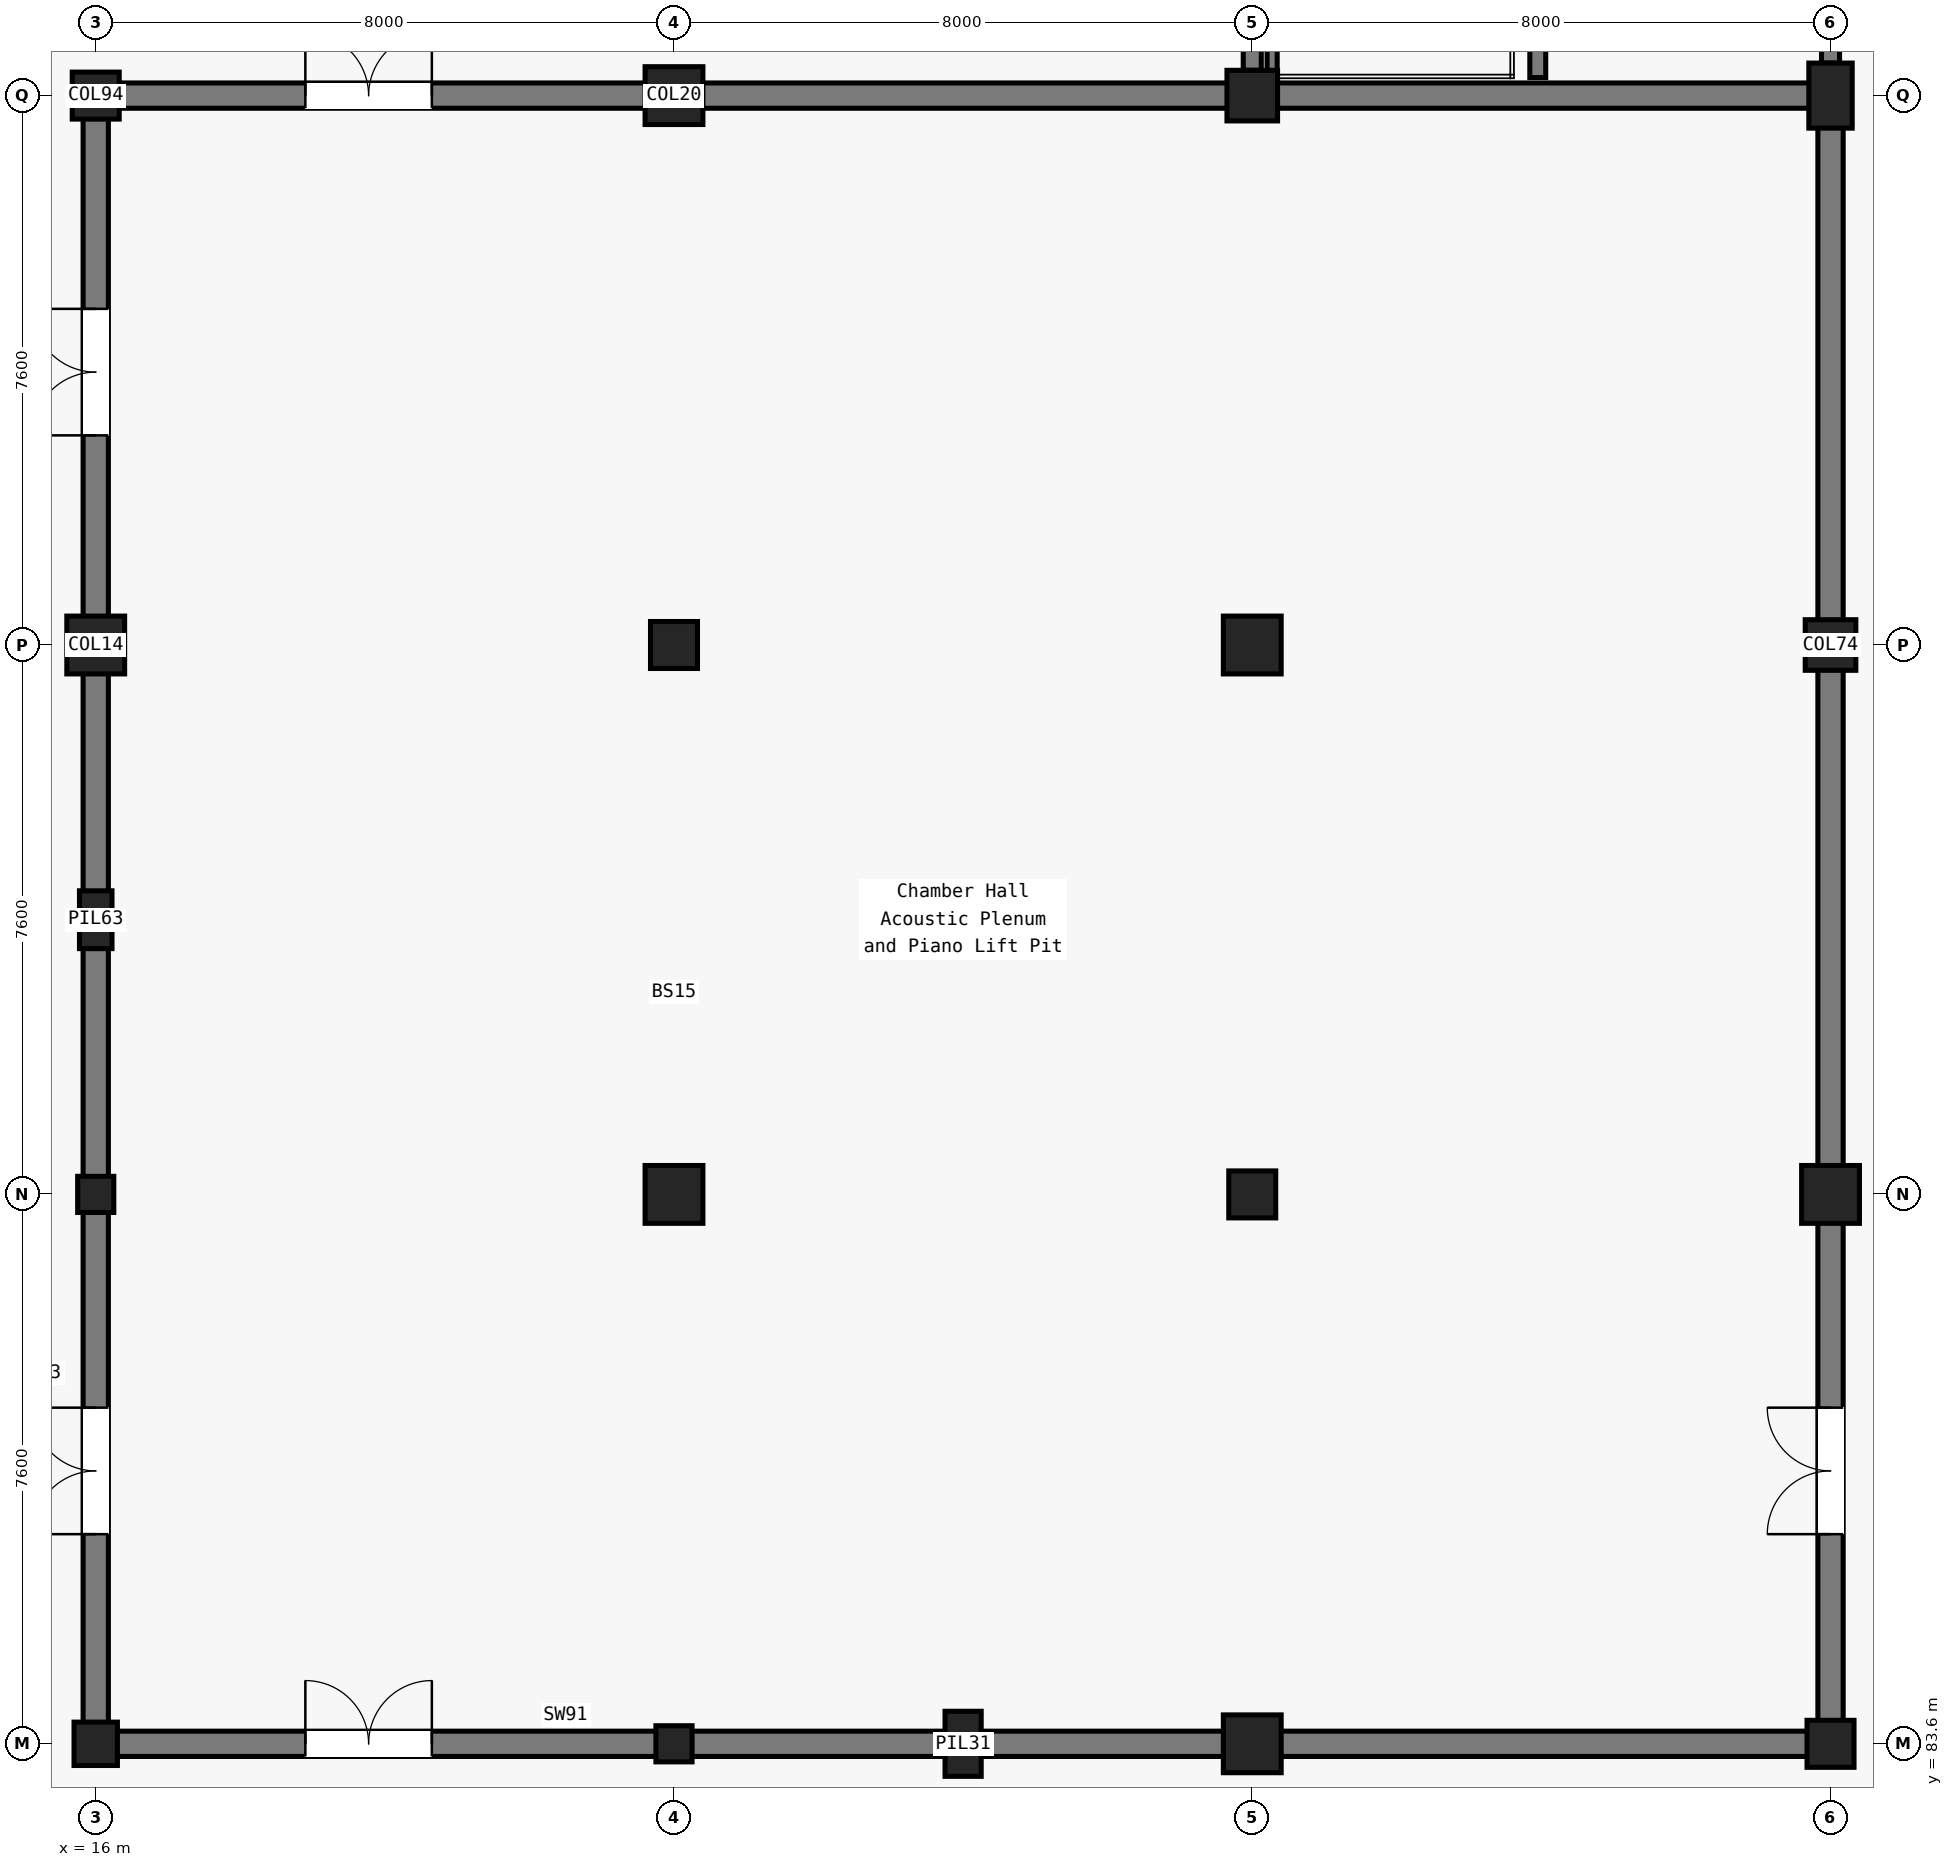
"""IFC4 building model, lengths in metres.
Left out: names, types, materials, properties, quantities, classifications, styles, units other than length and angle.
Written with IfcOpenShell. Run it as: python <this file> out.ifc"""

import sys

from ifc_helpers import new_model, si_unit, direction, frame, frame_2d, origin, origin_2d, place, context, subcontext, project, spatial, rectangle, circle, extrude, element, fill, save


model = new_model("IFC4")
c1 = context("Model", 3, precision=1e-05, world=origin(), true_north=direction((0.0, 1.0)))
c2 = subcontext(c1, "Body", "Model", "MODEL_VIEW")
j1 = project(units=[si_unit("LENGTHUNIT", "METRE"), si_unit("PLANEANGLEUNIT", "RADIAN")], contexts=[c1])
p1 = place(None, origin())
s1 = spatial("IfcSite", under=j1, at=p1, CompositionType="ELEMENT")
p2 = place(p1, origin())
s2 = spatial("IfcBuilding", under=s1, at=p2, CompositionType="ELEMENT")
p3 = place(p2, frame((0.0, 0.0, -5.4)))
s3 = spatial("IfcBuildingStorey", under=s2, at=p3, CompositionType="ELEMENT", Elevation=-5.4)
p4 = place(p3, frame((16.0, 83.6, 0.0), z_axis=(0.0, 0.0, 1.0), x_axis=(1.0, 0.0, 0.0)))
e1 = element("IfcColumn", 1, at=p4, inside=s3, PredefinedType="COLUMN", context=c2, shape_type="SweptSolid", body=[
    extrude(rectangle(XDim=0.6, YDim=0.6, at=origin_2d()), origin(), (0.0, 0.0, 1.0), 5.4),
])
p5 = place(p3, frame((16.0, 91.2, 0.0), z_axis=(0.0, 0.0, 1.0), x_axis=(1.0, 0.0, 0.0)))
e2 = element("IfcColumn", 2, at=p5, inside=s3, PredefinedType="COLUMN", context=c2, shape_type="SweptSolid", body=[
    extrude(rectangle(XDim=0.5, YDim=0.5, at=origin_2d()), origin(), (0.0, 0.0, 1.0), 5.4),
])
p6 = place(p3, frame((16.0, 98.8, 0.0), z_axis=(0.0, 0.0, 1.0), x_axis=(1.0, 0.0, 0.0)))
e3 = element("IfcColumn", 3, at=p6, inside=s3, PredefinedType="COLUMN", context=c2, shape_type="SweptSolid", body=[
    extrude(circle(Radius=0.4, at=origin_2d()), origin(), (0.0, 0.0, 1.0), 5.4),
])
p7 = place(p3, frame((16.0, 106.4, 0.0), z_axis=(0.0, 0.0, 1.0), x_axis=(1.0, 0.0, 0.0)))
e4 = element("IfcColumn", 4, at=p7, inside=s3, PredefinedType="COLUMN", context=c2, shape_type="SweptSolid", body=[
    extrude(circle(Radius=0.325, at=origin_2d()), origin(), (0.0, 0.0, 1.0), 5.4),
])
p8 = place(p3, frame((24.0, 83.6, 0.0), z_axis=(0.0, 0.0, 1.0), x_axis=(1.0, 0.0, 0.0)))
e5 = element("IfcColumn", 5, at=p8, inside=s3, PredefinedType="COLUMN", context=c2, shape_type="SweptSolid", body=[
    extrude(rectangle(XDim=0.5, YDim=0.5, at=origin_2d()), origin(), (0.0, 0.0, 1.0), 5.4),
])
p9 = place(p3, frame((24.0, 91.2, 0.0), z_axis=(0.0, 0.0, 1.0), x_axis=(1.0, 0.0, 0.0)))
e6 = element("IfcColumn", 6, at=p9, inside=s3, PredefinedType="COLUMN", context=c2, shape_type="SweptSolid", body=[
    extrude(circle(Radius=0.4, at=origin_2d()), origin(), (0.0, 0.0, 1.0), 5.4),
])
p10 = place(p3, frame((24.0, 98.8, 0.0), z_axis=(0.0, 0.0, 1.0), x_axis=(1.0, 0.0, 0.0)))
e7 = element("IfcColumn", 7, at=p10, inside=s3, PredefinedType="COLUMN", context=c2, shape_type="SweptSolid", body=[
    extrude(circle(Radius=0.325, at=origin_2d()), origin(), (0.0, 0.0, 1.0), 5.4),
])
p11 = place(p3, frame((24.0, 106.4, 0.0), z_axis=(0.0, 0.0, 1.0), x_axis=(1.0, 0.0, 0.0)))
e8 = element("IfcColumn", 8, at=p11, inside=s3, PredefinedType="COLUMN", context=c2, shape_type="SweptSolid", body=[
    extrude(rectangle(XDim=0.8, YDim=0.8, at=origin_2d()), origin(), (0.0, 0.0, 1.0), 5.4),
])
p12 = place(p3, frame((32.0, 83.6, 0.0), z_axis=(0.0, 0.0, 1.0), x_axis=(1.0, 0.0, 0.0)))
e9 = element("IfcColumn", 9, at=p12, inside=s3, PredefinedType="COLUMN", context=c2, shape_type="SweptSolid", body=[
    extrude(circle(Radius=0.4, at=origin_2d()), origin(), (0.0, 0.0, 1.0), 5.4),
])
p13 = place(p3, frame((32.0, 91.2, 0.0), z_axis=(0.0, 0.0, 1.0), x_axis=(1.0, 0.0, 0.0)))
e10 = element("IfcColumn", 10, at=p13, inside=s3, PredefinedType="COLUMN", context=c2, shape_type="SweptSolid", body=[
    extrude(circle(Radius=0.325, at=origin_2d()), origin(), (0.0, 0.0, 1.0), 5.4),
])
p14 = place(p3, frame((32.0, 98.8, 0.0), z_axis=(0.0, 0.0, 1.0), x_axis=(1.0, 0.0, 0.0)))
e11 = element("IfcColumn", 11, at=p14, inside=s3, PredefinedType="COLUMN", context=c2, shape_type="SweptSolid", body=[
    extrude(rectangle(XDim=0.8, YDim=0.8, at=origin_2d()), origin(), (0.0, 0.0, 1.0), 5.4),
])
p15 = place(p3, frame((32.0, 106.4, 0.0), z_axis=(0.0, 0.0, 1.0), x_axis=(1.0, 0.0, 0.0)))
e12 = element("IfcColumn", 12, at=p15, inside=s3, PredefinedType="COLUMN", context=c2, shape_type="SweptSolid", body=[
    extrude(rectangle(XDim=0.7, YDim=0.7, at=origin_2d()), origin(), (0.0, 0.0, 1.0), 5.4),
])
p16 = place(p3, frame((40.0, 83.6, 0.0), z_axis=(0.0, 0.0, 1.0), x_axis=(1.0, 0.0, 0.0)))
e13 = element("IfcColumn", 13, at=p16, inside=s3, PredefinedType="COLUMN", context=c2, shape_type="SweptSolid", body=[
    extrude(circle(Radius=0.325, at=origin_2d()), origin(), (0.0, 0.0, 1.0), 5.4),
])
p17 = place(p3, frame((40.0, 91.2, 0.0), z_axis=(0.0, 0.0, 1.0), x_axis=(1.0, 0.0, 0.0)))
e14 = element("IfcColumn", 14, at=p17, inside=s3, PredefinedType="COLUMN", context=c2, shape_type="SweptSolid", body=[
    extrude(rectangle(XDim=0.8, YDim=0.8, at=origin_2d()), origin(), (0.0, 0.0, 1.0), 5.4),
])
p18 = place(p3, frame((40.0, 98.8, 0.0), z_axis=(0.0, 0.0, 1.0), x_axis=(1.0, 0.0, 0.0)))
e15 = element("IfcColumn", 15, at=p18, inside=s3, PredefinedType="COLUMN", context=c2, shape_type="SweptSolid", body=[
    extrude(rectangle(XDim=0.7, YDim=0.7, at=origin_2d()), origin(), (0.0, 0.0, 1.0), 5.4),
])
p19 = place(p3, frame((40.0, 106.4, 0.0), z_axis=(0.0, 0.0, 1.0), x_axis=(1.0, 0.0, 0.0)))
e16 = element("IfcColumn", 16, at=p19, inside=s3, PredefinedType="COLUMN", context=c2, shape_type="SweptSolid", body=[
    extrude(rectangle(XDim=0.6, YDim=0.9, at=origin_2d()), origin(), (0.0, 0.0, 1.0), 5.4),
])
p20 = place(p3, frame((16.0, 95.0, 0.0), z_axis=(0.0, 0.0, 1.0), x_axis=(1.0, 0.0, 0.0)))
e17 = element("IfcColumn", 17, at=p20, inside=s3, PredefinedType="PILASTER", context=c2, shape_type="SweptSolid", body=[
    extrude(rectangle(XDim=0.45, YDim=0.8, at=origin_2d()), origin(), (0.0, 0.0, 1.0), 5.4),
])
p21 = place(p3, frame((28.0, 83.6, 0.0), z_axis=(0.0, 0.0, 1.0), x_axis=(1.0, 0.0, 0.0)))
e18 = element("IfcColumn", 18, at=p21, inside=s3, PredefinedType="PILASTER", context=c2, shape_type="SweptSolid", body=[
    extrude(rectangle(XDim=0.5, YDim=0.9, at=origin_2d()), origin(), (0.0, 0.0, 1.0), 5.4),
])
p22 = place(p3, frame((16.0, 83.6, 0.0), z_axis=(0.0, 0.0, 1.0), x_axis=(1.0, 0.0, 0.0)))
e19 = element("IfcWall", 19, at=p22, inside=s3, PredefinedType="SHEAR", context=c2, shape_type="SweptSolid", body=[
    extrude(rectangle(XDim=8.0, YDim=0.35, at=frame_2d((4.0, 0.0))), origin(), (0.0, 0.0, 1.0), 5.08),
])
p23 = place(p22, frame((2.9, 0.0, 0.0)))
e20 = element("IfcOpeningElement", 20, at=p23, cuts=e19, PredefinedType="OPENING", context=c2, shape_type="SweptSolid", body=[
    extrude(rectangle(XDim=1.75, YDim=2.25, at=frame_2d((0.875, 1.125))), frame((0.0, 0.185, 0.0), z_axis=(0.0, -1.0, 0.0), x_axis=(1.0, 0.0, 0.0)), (0.0, 0.0, 1.0), 0.37),
])
for number, where, z_axis, x_axis in (
    (21, (24.0, 83.6, 0.0), (0.0, 0.0, 1.0), (1.0, 0.0, 0.0)),
    (22, (32.0, 83.6, 0.0), (0.0, 0.0, 1.0), (1.0, 0.0, 0.0)),
):
    element("IfcWall", number, at=place(p3, frame(where, z_axis=z_axis, x_axis=x_axis)), inside=s3, PredefinedType="SHEAR", context=c2, shape_type="SweptSolid", body=[
        extrude(rectangle(XDim=8.0, YDim=0.35, at=frame_2d((4.0, 0.0))), origin(), (0.0, 0.0, 1.0), 5.08),
    ])
p24 = place(p3, frame((16.0, 106.4, 0.0), z_axis=(0.0, 0.0, 1.0), x_axis=(1.0, 0.0, 0.0)))
e23 = element("IfcWall", 23, at=p24, inside=s3, PredefinedType="SHEAR", context=c2, shape_type="SweptSolid", body=[
    extrude(rectangle(XDim=8.0, YDim=0.35, at=frame_2d((4.0, 0.0))), origin(), (0.0, 0.0, 1.0), 5.08),
])
p25 = place(p24, frame((2.9, 0.0, 0.0)))
e24 = element("IfcOpeningElement", 24, at=p25, cuts=e23, PredefinedType="OPENING", context=c2, shape_type="SweptSolid", body=[
    extrude(rectangle(XDim=1.75, YDim=2.25, at=frame_2d((0.875, 1.125))), frame((0.0, 0.185, 0.0), z_axis=(0.0, -1.0, 0.0), x_axis=(1.0, 0.0, 0.0)), (0.0, 0.0, 1.0), 0.37),
])
for number, where, z_axis, x_axis in (
    (25, (24.0, 106.4, 0.0), (0.0, 0.0, 1.0), (1.0, 0.0, 0.0)),
    (26, (32.0, 106.4, 0.0), (0.0, 0.0, 1.0), (1.0, 0.0, 0.0)),
):
    element("IfcWall", number, at=place(p3, frame(where, z_axis=z_axis, x_axis=x_axis)), inside=s3, PredefinedType="SHEAR", context=c2, shape_type="SweptSolid", body=[
        extrude(rectangle(XDim=8.0, YDim=0.35, at=frame_2d((4.0, 0.0))), origin(), (0.0, 0.0, 1.0), 5.08),
    ])
p26 = place(p3, frame((16.0, 83.6, 0.0), z_axis=(0.0, 0.0, 1.0), x_axis=(0.0, 1.0, 0.0)))
e27 = element("IfcWall", 27, at=p26, inside=s3, PredefinedType="SHEAR", context=c2, shape_type="SweptSolid", body=[
    extrude(rectangle(XDim=7.6, YDim=0.35, at=frame_2d((3.8, 0.0))), origin(), (0.0, 0.0, 1.0), 5.08),
])
p27 = place(p26, frame((2.9, 0.0, 0.0)))
e28 = element("IfcOpeningElement", 28, at=p27, cuts=e27, PredefinedType="OPENING", context=c2, shape_type="SweptSolid", body=[
    extrude(rectangle(XDim=1.75, YDim=2.25, at=frame_2d((0.875, 1.125))), frame((0.0, 0.185, 0.0), z_axis=(0.0, -1.0, 0.0), x_axis=(1.0, 0.0, 0.0)), (0.0, 0.0, 1.0), 0.37),
])
p28 = place(p3, frame((16.0, 91.2, 0.0), z_axis=(0.0, 0.0, 1.0), x_axis=(0.0, 1.0, 0.0)))
e29 = element("IfcWall", 29, at=p28, inside=s3, PredefinedType="SHEAR", context=c2, shape_type="SweptSolid", body=[
    extrude(rectangle(XDim=7.6, YDim=0.35, at=frame_2d((3.8, 0.0))), origin(), (0.0, 0.0, 1.0), 5.08),
])
p29 = place(p3, frame((16.0, 98.8, 0.0), z_axis=(0.0, 0.0, 1.0), x_axis=(0.0, 1.0, 0.0)))
e30 = element("IfcWall", 30, at=p29, inside=s3, PredefinedType="SHEAR", context=c2, shape_type="SweptSolid", body=[
    extrude(rectangle(XDim=7.6, YDim=0.35, at=frame_2d((3.8, 0.0))), origin(), (0.0, 0.0, 1.0), 5.08),
])
p30 = place(p29, frame((2.9, 0.0, 0.0)))
e31 = element("IfcOpeningElement", 31, at=p30, cuts=e30, PredefinedType="OPENING", context=c2, shape_type="SweptSolid", body=[
    extrude(rectangle(XDim=1.75, YDim=2.25, at=frame_2d((0.875, 1.125))), frame((0.0, 0.185, 0.0), z_axis=(0.0, -1.0, 0.0), x_axis=(1.0, 0.0, 0.0)), (0.0, 0.0, 1.0), 0.37),
])
p31 = place(p3, frame((40.0, 83.6, 0.0), z_axis=(0.0, 0.0, 1.0), x_axis=(0.0, 1.0, 0.0)))
e32 = element("IfcWall", 32, at=p31, inside=s3, PredefinedType="SHEAR", context=c2, shape_type="SweptSolid", body=[
    extrude(rectangle(XDim=7.6, YDim=0.35, at=frame_2d((3.8, 0.0))), origin(), (0.0, 0.0, 1.0), 5.08),
])
p32 = place(p31, frame((2.9, 0.0, 0.0)))
e33 = element("IfcOpeningElement", 33, at=p32, cuts=e32, PredefinedType="OPENING", context=c2, shape_type="SweptSolid", body=[
    extrude(rectangle(XDim=1.75, YDim=2.25, at=frame_2d((0.875, 1.125))), frame((0.0, 0.185, 0.0), z_axis=(0.0, -1.0, 0.0), x_axis=(1.0, 0.0, 0.0)), (0.0, 0.0, 1.0), 0.37),
])
p33 = place(p3, frame((40.0, 91.2, 0.0), z_axis=(0.0, 0.0, 1.0), x_axis=(0.0, 1.0, 0.0)))
e34 = element("IfcWall", 34, at=p33, inside=s3, PredefinedType="SHEAR", context=c2, shape_type="SweptSolid", body=[
    extrude(rectangle(XDim=7.6, YDim=0.35, at=frame_2d((3.8, 0.0))), origin(), (0.0, 0.0, 1.0), 5.08),
])
p34 = place(p3, frame((40.0, 98.8, 0.0), z_axis=(0.0, 0.0, 1.0), x_axis=(0.0, 1.0, 0.0)))
e35 = element("IfcWall", 35, at=p34, inside=s3, PredefinedType="SHEAR", context=c2, shape_type="SweptSolid", body=[
    extrude(rectangle(XDim=7.6, YDim=0.35, at=frame_2d((3.8, 0.0))), origin(), (0.0, 0.0, 1.0), 5.08),
])
p35 = place(p3, frame((32.0, 106.75, 0.0), z_axis=(0.0, 0.0, 1.0), x_axis=(0.0, 1.0, 0.0)))
e36 = element("IfcWall", 36, at=p35, inside=s3, PredefinedType="SOLIDWALL", context=c2, shape_type="SweptSolid", body=[
    extrude(rectangle(XDim=6.8, YDim=0.25, at=frame_2d((3.4, 0.0))), origin(), (0.0, 0.0, 1.0), 4.205),
])
p36 = place(p3, frame((35.95, 106.65, 0.0), z_axis=(0.0, 0.0, 1.0), x_axis=(0.0, 1.0, 0.0)))
e37 = element("IfcWall", 37, at=p36, inside=s3, PredefinedType="SOLIDWALL", context=c2, shape_type="SweptSolid", body=[
    extrude(rectangle(XDim=7.1, YDim=0.22, at=frame_2d((3.55, 0.0))), origin(), (0.0, 0.0, 1.0), 5.08),
])
p37 = place(p36, frame((5.55, 0.0, 0.0)))
e38 = element("IfcOpeningElement", 38, at=p37, cuts=e37, PredefinedType="OPENING", context=c2, shape_type="SweptSolid", body=[
    extrude(rectangle(XDim=1.2, YDim=2.15, at=frame_2d((0.6, 1.075))), frame((0.0, 0.12, 0.0), z_axis=(0.0, -1.0, 0.0), x_axis=(1.0, 0.0, 0.0)), (0.0, 0.0, 1.0), 0.24),
])
p38 = place(p3, frame((40.0, 106.85, 0.0), z_axis=(0.0, 0.0, 1.0), x_axis=(0.0, 1.0, 0.0)))
e39 = element("IfcWall", 39, at=p38, inside=s3, PredefinedType="SOLIDWALL", context=c2, shape_type="SweptSolid", body=[
    extrude(rectangle(XDim=6.775, YDim=0.25, at=frame_2d((3.387, 0.0))), origin(), (0.0, 0.0, 1.0), 4.305),
])
p39 = place(p38, frame((3.4, 0.0, 0.0)))
e40 = element("IfcOpeningElement", 40, at=p39, cuts=e39, PredefinedType="OPENING", context=c2, shape_type="SweptSolid", body=[
    extrude(rectangle(XDim=1.35, YDim=2.2, at=frame_2d((0.675, 1.1))), frame((0.0, 0.135, 0.0), z_axis=(0.0, -1.0, 0.0), x_axis=(1.0, 0.0, 0.0)), (0.0, 0.0, 1.0), 0.27),
])
p40 = place(p3, frame((32.275, 106.55, 0.0), z_axis=(0.0, 0.0, 1.0), x_axis=(0.0, 1.0, 0.0)))
e41 = element("IfcWall", 41, at=p40, inside=s3, PredefinedType="SOLIDWALL", context=c2, shape_type="SweptSolid", body=[
    extrude(rectangle(XDim=7.3, YDim=0.14, at=frame_2d((3.65, 0.0))), origin(), (0.0, 0.0, 1.0), 5.08),
])
p41 = place(p27, origin())
e42 = element("IfcDoor", 42, at=p41, inside=s3, OperationType="DOUBLE_DOOR_SINGLE_SWING", PredefinedType="DOOR", context=c2, shape_type="SweptSolid", body=[
    extrude(rectangle(XDim=1.75, YDim=2.25, at=frame_2d((0.875, 1.125))), frame((0.0, 0.025, 0.0), z_axis=(0.0, -1.0, 0.0), x_axis=(1.0, 0.0, 0.0)), (0.0, 0.0, 1.0), 0.05),
])
fill(e28, e42)
p42 = place(p30, origin())
e43 = element("IfcDoor", 43, at=p42, inside=s3, OperationType="DOUBLE_DOOR_SINGLE_SWING", PredefinedType="DOOR", context=c2, shape_type="SweptSolid", body=[
    extrude(rectangle(XDim=1.75, YDim=2.25, at=frame_2d((0.875, 1.125))), frame((0.0, 0.025, 0.0), z_axis=(0.0, -1.0, 0.0), x_axis=(1.0, 0.0, 0.0)), (0.0, 0.0, 1.0), 0.05),
])
fill(e31, e43)
p43 = place(p23, origin())
e44 = element("IfcDoor", 44, at=p43, inside=s3, OperationType="DOUBLE_DOOR_SINGLE_SWING", PredefinedType="DOOR", context=c2, shape_type="SweptSolid", body=[
    extrude(rectangle(XDim=1.75, YDim=2.25, at=frame_2d((0.875, 1.125))), frame((0.0, 0.025, 0.0), z_axis=(0.0, -1.0, 0.0), x_axis=(1.0, 0.0, 0.0)), (0.0, 0.0, 1.0), 0.05),
])
fill(e20, e44)
p44 = place(p25, origin())
e45 = element("IfcDoor", 45, at=p44, inside=s3, OperationType="DOUBLE_DOOR_SINGLE_SWING", PredefinedType="DOOR", context=c2, shape_type="SweptSolid", body=[
    extrude(rectangle(XDim=1.75, YDim=2.25, at=frame_2d((0.875, 1.125))), frame((0.0, 0.025, 0.0), z_axis=(0.0, -1.0, 0.0), x_axis=(1.0, 0.0, 0.0)), (0.0, 0.0, 1.0), 0.05),
])
fill(e24, e45)
p45 = place(p32, origin())
e46 = element("IfcDoor", 46, at=p45, inside=s3, OperationType="DOUBLE_DOOR_SINGLE_SWING", PredefinedType="DOOR", context=c2, shape_type="SweptSolid", body=[
    extrude(rectangle(XDim=1.75, YDim=2.25, at=frame_2d((0.875, 1.125))), frame((0.0, 0.025, 0.0), z_axis=(0.0, -1.0, 0.0), x_axis=(1.0, 0.0, 0.0)), (0.0, 0.0, 1.0), 0.05),
])
fill(e33, e46)
save(model, sys.argv[1])
